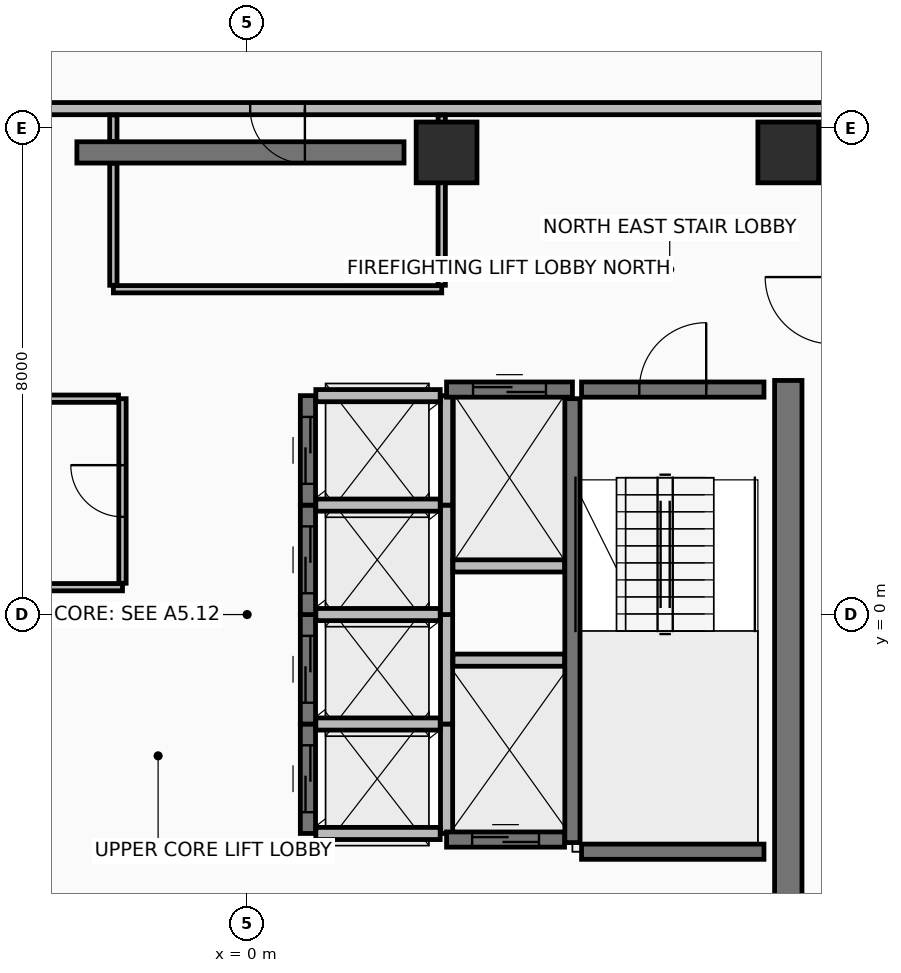
"""IFC4 building model, lengths in metres.
Left out: names, types, materials, properties, quantities, classifications, styles, units other than length and angle.
Written with IfcOpenShell. Run it as: python <this file> out.ifc"""

import sys

from ifc_helpers import new_model, si_unit, direction, frame, frame_2d, origin, origin_2d, place, context, subcontext, project, spatial, rectangle, extrude, element, fill, save


model = new_model("IFC4")
c1 = context("Model", 3, precision=1e-05, world=origin(), true_north=direction((0.0, 1.0)))
c2 = subcontext(c1, "Body", "Model", "MODEL_VIEW")
j1 = project(units=[si_unit("LENGTHUNIT", "METRE"), si_unit("PLANEANGLEUNIT", "RADIAN")], contexts=[c1])
p1 = place(None, origin())
s1 = spatial("IfcSite", under=j1, at=p1, CompositionType="ELEMENT")
p2 = place(p1, origin())
s2 = spatial("IfcBuilding", under=s1, at=p2, CompositionType="ELEMENT")
p3 = place(p2, frame((0.0, 0.0, 267.8)))
s3 = spatial("IfcBuildingStorey", under=s2, at=p3, CompositionType="ELEMENT", Elevation=267.8)
for number, where, z_axis, x_axis in (
    (1, (8.9, 7.6, 0.0), (0.0, 0.0, 1.0), (1.0, 0.0, 0.0)),
    (2, (3.28, 7.6, 0.0), (0.0, 0.0, 1.0), (1.0, 0.0, 0.0)),
):
    element("IfcColumn", number, at=place(p3, frame(where, z_axis=z_axis, x_axis=x_axis)), inside=s3, PredefinedType="COLUMN", context=c2, shape_type="SweptSolid", body=[
        extrude(rectangle(XDim=1.0, YDim=1.0, at=origin_2d()), origin(), (0.0, 0.0, 1.0), 3.6),
    ])
p4 = place(p3, frame((-2.8, 7.6, 0.0), z_axis=(0.0, 0.0, 1.0), x_axis=(1.0, 0.0, 0.0)))
e3 = element("IfcWall", 3, at=p4, inside=s3, PredefinedType="SHEAR", context=c2, shape_type="SweptSolid", body=[
    extrude(rectangle(XDim=5.38, YDim=0.35, at=frame_2d((2.69, 0.0))), origin(), (0.0, 0.0, 1.0), 3.42),
])
p5 = place(p3, frame((8.9, -6.85, 0.0), z_axis=(0.0, 0.0, 1.0), x_axis=(0.0, 1.0, 0.0)))
e4 = element("IfcWall", 4, at=p5, inside=s3, PredefinedType="SHEAR", context=c2, shape_type="SweptSolid", body=[
    extrude(rectangle(XDim=10.7, YDim=0.45, at=frame_2d((5.35, 0.0))), origin(), (0.0, 0.0, 1.0), 3.42),
])
p6 = place(p3, frame((9.62, 8.32, 0.0), z_axis=(0.0, 0.0, 1.0), x_axis=(-1.0, 0.0, 0.0)))
e5 = element("IfcWall", 5, at=p6, inside=s3, PredefinedType="PARTITIONING", context=c2, shape_type="SweptSolid", body=[
    extrude(rectangle(XDim=19.24, YDim=0.2, at=frame_2d((9.62, 0.0))), origin(), (0.0, 0.0, 1.0), 2.915),
])
p7 = place(p6, frame((8.67, 0.0, 0.0)))
e6 = element("IfcOpeningElement", 6, at=p7, cuts=e5, PredefinedType="OPENING", context=c2, shape_type="SweptSolid", body=[
    extrude(rectangle(XDim=0.9, YDim=2.1, at=frame_2d((0.45, 1.05))), frame((0.0, 0.11, 0.0), z_axis=(0.0, -1.0, 0.0), x_axis=(1.0, 0.0, 0.0)), (0.0, 0.0, 1.0), 0.22),
])
p8 = place(p6, frame((15.745, 0.0, 0.0)))
e7 = element("IfcOpeningElement", 7, at=p8, cuts=e5, PredefinedType="OPENING", context=c2, shape_type="SweptSolid", body=[
    extrude(rectangle(XDim=0.9, YDim=2.1, at=frame_2d((0.45, 1.05))), frame((0.0, 0.11, 0.0), z_axis=(0.0, -1.0, 0.0), x_axis=(1.0, 0.0, 0.0)), (0.0, 0.0, 1.0), 0.22),
])
p9 = place(p6, frame((13.795, 0.0, 0.0)))
e8 = element("IfcOpeningElement", 8, at=p9, cuts=e5, PredefinedType="OPENING", context=c2, shape_type="SweptSolid", body=[
    extrude(rectangle(XDim=0.9, YDim=2.1, at=frame_2d((0.45, 1.05))), frame((0.0, 0.11, 0.0), z_axis=(0.0, -1.0, 0.0), x_axis=(1.0, 0.0, 0.0)), (0.0, 0.0, 1.0), 0.22),
])
p10 = place(p3, frame((5.35, -3.75, 0.0), z_axis=(0.0, 0.0, 1.0), x_axis=(0.0, 1.0, 0.0)))
e9 = element("IfcWall", 9, at=p10, inside=s3, PredefinedType="SHEAR", context=c2, shape_type="SweptSolid", body=[
    extrude(rectangle(XDim=7.3, YDim=0.25, at=frame_2d((3.65, 0.0))), origin(), (0.0, 0.0, 1.0), 3.42),
])
p11 = place(p3, frame((5.5, 3.7, 0.0), z_axis=(0.0, 0.0, 1.0), x_axis=(1.0, 0.0, 0.0)))
e10 = element("IfcWall", 10, at=p11, inside=s3, PredefinedType="SHEAR", context=c2, shape_type="SweptSolid", body=[
    extrude(rectangle(XDim=3.0, YDim=0.25, at=frame_2d((1.5, 0.0))), origin(), (0.0, 0.0, 1.0), 3.42),
])
p12 = place(p11, frame((0.95, 0.0, 0.0)))
e11 = element("IfcOpeningElement", 11, at=p12, cuts=e10, PredefinedType="OPENING", context=c2, shape_type="SweptSolid", body=[
    extrude(rectangle(XDim=1.1, YDim=2.15, at=frame_2d((0.55, 1.075))), frame((0.0, 0.135, 0.0), z_axis=(0.0, -1.0, 0.0), x_axis=(1.0, 0.0, 0.0)), (0.0, 0.0, 1.0), 0.27),
])
p13 = place(p3, frame((5.5, -3.9, 0.0), z_axis=(0.0, 0.0, 1.0), x_axis=(1.0, 0.0, 0.0)))
e12 = element("IfcWall", 12, at=p13, inside=s3, PredefinedType="SHEAR", context=c2, shape_type="SweptSolid", body=[
    extrude(rectangle(XDim=3.0, YDim=0.25, at=frame_2d((1.5, 0.0))), origin(), (0.0, 0.0, 1.0), 3.42),
])
p14 = place(p3, frame((1.0, -3.6, 0.0), z_axis=(0.0, 0.0, 1.0), x_axis=(0.0, 1.0, 0.0)))
e13 = element("IfcWall", 13, at=p14, inside=s3, PredefinedType="SHEAR", context=c2, shape_type="SweptSolid", body=[
    extrude(rectangle(XDim=1.8, YDim=0.25, at=frame_2d((0.9, 0.0))), origin(), (0.0, 0.0, 1.0), 3.42),
])
p15 = place(p14, frame((0.35, 0.0, 0.0)))
e14 = element("IfcOpeningElement", 14, at=p15, cuts=e13, PredefinedType="OPENING", context=c2, shape_type="SweptSolid", body=[
    extrude(rectangle(XDim=1.1, YDim=2.2, at=frame_2d((0.55, 1.1))), frame((0.0, 0.135, 0.0), z_axis=(0.0, -1.0, 0.0), x_axis=(1.0, 0.0, 0.0)), (0.0, 0.0, 1.0), 0.27),
])
p16 = place(p3, frame((3.28, -3.6, 0.0), z_axis=(0.0, 0.0, 1.0), x_axis=(0.0, 1.0, 0.0)))
e15 = element("IfcWall", 15, at=p16, inside=s3, PredefinedType="PARTITIONING", context=c2, shape_type="SweptSolid", body=[
    extrude(rectangle(XDim=1.8, YDim=0.2, at=frame_2d((0.9, 0.0))), origin(), (0.0, 0.0, 1.0), 3.42),
])
for number, where, z_axis, x_axis in (
    (16, (1.13, -3.6, 0.0), (0.0, 0.0, 1.0), (1.0, 0.0, 0.0)),
    (17, (1.13, -1.8, 0.0), (0.0, 0.0, 1.0), (1.0, 0.0, 0.0)),
):
    element("IfcWall", number, at=place(p3, frame(where, z_axis=z_axis, x_axis=x_axis)), inside=s3, PredefinedType="PARTITIONING", context=c2, shape_type="SweptSolid", body=[
        extrude(rectangle(XDim=2.045, YDim=0.2, at=frame_2d((1.022, 0.0))), origin(), (0.0, 0.0, 1.0), 3.42),
    ])
p17 = place(p3, frame((1.0, -1.8, 0.0), z_axis=(0.0, 0.0, 1.0), x_axis=(0.0, 1.0, 0.0)))
e18 = element("IfcWall", 18, at=p17, inside=s3, PredefinedType="SHEAR", context=c2, shape_type="SweptSolid", body=[
    extrude(rectangle(XDim=1.8, YDim=0.25, at=frame_2d((0.9, 0.0))), origin(), (0.0, 0.0, 1.0), 3.42),
])
p18 = place(p17, frame((0.35, 0.0, 0.0)))
e19 = element("IfcOpeningElement", 19, at=p18, cuts=e18, PredefinedType="OPENING", context=c2, shape_type="SweptSolid", body=[
    extrude(rectangle(XDim=1.1, YDim=2.2, at=frame_2d((0.55, 1.1))), frame((0.0, 0.135, 0.0), z_axis=(0.0, -1.0, 0.0), x_axis=(1.0, 0.0, 0.0)), (0.0, 0.0, 1.0), 0.27),
])
p19 = place(p3, frame((3.28, -1.8, 0.0), z_axis=(0.0, 0.0, 1.0), x_axis=(0.0, 1.0, 0.0)))
e20 = element("IfcWall", 20, at=p19, inside=s3, PredefinedType="PARTITIONING", context=c2, shape_type="SweptSolid", body=[
    extrude(rectangle(XDim=1.8, YDim=0.2, at=frame_2d((0.9, 0.0))), origin(), (0.0, 0.0, 1.0), 3.42),
])
p20 = place(p3, frame((1.13, 0.0, 0.0), z_axis=(0.0, 0.0, 1.0), x_axis=(1.0, 0.0, 0.0)))
e21 = element("IfcWall", 21, at=p20, inside=s3, PredefinedType="PARTITIONING", context=c2, shape_type="SweptSolid", body=[
    extrude(rectangle(XDim=2.045, YDim=0.2, at=frame_2d((1.022, 0.0))), origin(), (0.0, 0.0, 1.0), 3.42),
])
p21 = place(p3, frame((1.0, 0.0, 0.0), z_axis=(0.0, 0.0, 1.0), x_axis=(0.0, 1.0, 0.0)))
e22 = element("IfcWall", 22, at=p21, inside=s3, PredefinedType="SHEAR", context=c2, shape_type="SweptSolid", body=[
    extrude(rectangle(XDim=1.8, YDim=0.25, at=frame_2d((0.9, 0.0))), origin(), (0.0, 0.0, 1.0), 3.42),
])
p22 = place(p21, frame((0.35, 0.0, 0.0)))
e23 = element("IfcOpeningElement", 23, at=p22, cuts=e22, PredefinedType="OPENING", context=c2, shape_type="SweptSolid", body=[
    extrude(rectangle(XDim=1.1, YDim=2.2, at=frame_2d((0.55, 1.1))), frame((0.0, 0.135, 0.0), z_axis=(0.0, -1.0, 0.0), x_axis=(1.0, 0.0, 0.0)), (0.0, 0.0, 1.0), 0.27),
])
p23 = place(p3, frame((3.28, 0.0, 0.0), z_axis=(0.0, 0.0, 1.0), x_axis=(0.0, 1.0, 0.0)))
e24 = element("IfcWall", 24, at=p23, inside=s3, PredefinedType="PARTITIONING", context=c2, shape_type="SweptSolid", body=[
    extrude(rectangle(XDim=1.8, YDim=0.2, at=frame_2d((0.9, 0.0))), origin(), (0.0, 0.0, 1.0), 3.42),
])
p24 = place(p3, frame((1.13, 1.8, 0.0), z_axis=(0.0, 0.0, 1.0), x_axis=(1.0, 0.0, 0.0)))
e25 = element("IfcWall", 25, at=p24, inside=s3, PredefinedType="PARTITIONING", context=c2, shape_type="SweptSolid", body=[
    extrude(rectangle(XDim=2.045, YDim=0.2, at=frame_2d((1.022, 0.0))), origin(), (0.0, 0.0, 1.0), 3.42),
])
p25 = place(p3, frame((1.0, 1.8, 0.0), z_axis=(0.0, 0.0, 1.0), x_axis=(0.0, 1.0, 0.0)))
e26 = element("IfcWall", 26, at=p25, inside=s3, PredefinedType="SHEAR", context=c2, shape_type="SweptSolid", body=[
    extrude(rectangle(XDim=1.8, YDim=0.25, at=frame_2d((0.9, 0.0))), origin(), (0.0, 0.0, 1.0), 3.42),
])
p26 = place(p25, frame((0.35, 0.0, 0.0)))
e27 = element("IfcOpeningElement", 27, at=p26, cuts=e26, PredefinedType="OPENING", context=c2, shape_type="SweptSolid", body=[
    extrude(rectangle(XDim=1.1, YDim=2.2, at=frame_2d((0.55, 1.1))), frame((0.0, 0.135, 0.0), z_axis=(0.0, -1.0, 0.0), x_axis=(1.0, 0.0, 0.0)), (0.0, 0.0, 1.0), 0.27),
])
p27 = place(p3, frame((3.28, 1.8, 0.0), z_axis=(0.0, 0.0, 1.0), x_axis=(0.0, 1.0, 0.0)))
e28 = element("IfcWall", 28, at=p27, inside=s3, PredefinedType="PARTITIONING", context=c2, shape_type="SweptSolid", body=[
    extrude(rectangle(XDim=1.8, YDim=0.2, at=frame_2d((0.9, 0.0))), origin(), (0.0, 0.0, 1.0), 3.42),
])
p28 = place(p3, frame((1.13, 3.6, 0.0), z_axis=(0.0, 0.0, 1.0), x_axis=(1.0, 0.0, 0.0)))
e29 = element("IfcWall", 29, at=p28, inside=s3, PredefinedType="PARTITIONING", context=c2, shape_type="SweptSolid", body=[
    extrude(rectangle(XDim=2.045, YDim=0.2, at=frame_2d((1.022, 0.0))), origin(), (0.0, 0.0, 1.0), 2.715),
])
p29 = place(p3, frame((3.28, 3.7, 0.0), z_axis=(0.0, 0.0, 1.0), x_axis=(1.0, 0.0, 0.0)))
e30 = element("IfcWall", 30, at=p29, inside=s3, PredefinedType="SHEAR", context=c2, shape_type="SweptSolid", body=[
    extrude(rectangle(XDim=2.07, YDim=0.25, at=frame_2d((1.035, 0.0))), origin(), (0.0, 0.0, 1.0), 3.42),
])
p30 = place(p29, frame((0.435, 0.0, 0.0)))
e31 = element("IfcOpeningElement", 31, at=p30, cuts=e30, PredefinedType="OPENING", context=c2, shape_type="SweptSolid", body=[
    extrude(rectangle(XDim=1.2, YDim=2.2, at=frame_2d((0.6, 1.1))), frame((0.0, 0.135, 0.0), z_axis=(0.0, -1.0, 0.0), x_axis=(1.0, 0.0, 0.0)), (0.0, 0.0, 1.0), 0.27),
])
p31 = place(p3, frame((3.385, 0.8, 0.0), z_axis=(0.0, 0.0, 1.0), x_axis=(1.0, 0.0, 0.0)))
e32 = element("IfcWall", 32, at=p31, inside=s3, PredefinedType="PARTITIONING", context=c2, shape_type="SweptSolid", body=[
    extrude(rectangle(XDim=1.835, YDim=0.2, at=frame_2d((0.917, 0.0))), origin(), (0.0, 0.0, 1.0), 3.42),
])
p32 = place(p3, frame((3.28, -3.7, 0.0), z_axis=(0.0, 0.0, 1.0), x_axis=(1.0, 0.0, 0.0)))
e33 = element("IfcWall", 33, at=p32, inside=s3, PredefinedType="SHEAR", context=c2, shape_type="SweptSolid", body=[
    extrude(rectangle(XDim=1.94, YDim=0.25, at=frame_2d((0.97, 0.0))), origin(), (0.0, 0.0, 1.0), 3.42),
])
p33 = place(p32, frame((0.42, 0.0, 0.0)))
e34 = element("IfcOpeningElement", 34, at=p33, cuts=e33, PredefinedType="OPENING", context=c2, shape_type="SweptSolid", body=[
    extrude(rectangle(XDim=1.1, YDim=2.2, at=frame_2d((0.55, 1.1))), frame((0.0, 0.135, 0.0), z_axis=(0.0, -1.0, 0.0), x_axis=(1.0, 0.0, 0.0)), (0.0, 0.0, 1.0), 0.27),
])
p34 = place(p3, frame((3.385, -0.75, 0.0), z_axis=(0.0, 0.0, 1.0), x_axis=(1.0, 0.0, 0.0)))
e35 = element("IfcWall", 35, at=p34, inside=s3, PredefinedType="PARTITIONING", context=c2, shape_type="SweptSolid", body=[
    extrude(rectangle(XDim=1.835, YDim=0.2, at=frame_2d((0.917, 0.0))), origin(), (0.0, 0.0, 1.0), 3.42),
])
p35 = place(p3, frame((-5.22, 0.45, 0.0), z_axis=(0.0, 0.0, 1.0), x_axis=(1.0, 0.0, 0.0)))
e36 = element("IfcWall", 36, at=p35, inside=s3, PredefinedType="PARTITIONING", context=c2, shape_type="SweptSolid", body=[
    extrude(rectangle(XDim=3.17, YDim=0.12, at=frame_2d((1.585, 0.0))), origin(), (0.0, 0.0, 1.0), 3.42),
])
p36 = place(p3, frame((-2.05, 0.515, 0.0), z_axis=(0.0, 0.0, 1.0), x_axis=(0.0, 1.0, 0.0)))
e37 = element("IfcWall", 37, at=p36, inside=s3, PredefinedType="PARTITIONING", context=c2, shape_type="SweptSolid", body=[
    extrude(rectangle(XDim=3.035, YDim=0.12, at=frame_2d((1.518, 0.0))), origin(), (0.0, 0.0, 1.0), 3.42),
])
p37 = place(p36, frame((1.092, 0.0, 0.0)))
e38 = element("IfcOpeningElement", 38, at=p37, cuts=e37, PredefinedType="OPENING", context=c2, shape_type="SweptSolid", body=[
    extrude(rectangle(XDim=0.85, YDim=2.1, at=frame_2d((0.425, 1.05))), frame((0.0, 0.07, 0.0), z_axis=(0.0, -1.0, 0.0), x_axis=(1.0, 0.0, 0.0)), (0.0, 0.0, 1.0), 0.14),
])
p38 = place(p3, frame((-2.115, 3.55, 0.0), z_axis=(0.0, 0.0, 1.0), x_axis=(-1.0, 0.0, 0.0)))
e39 = element("IfcWall", 39, at=p38, inside=s3, PredefinedType="PARTITIONING", context=c2, shape_type="SweptSolid", body=[
    extrude(rectangle(XDim=3.105, YDim=0.12, at=frame_2d((1.552, 0.0))), origin(), (0.0, 0.0, 1.0), 3.42),
])
p39 = place(p3, frame((-2.2, 5.35, 0.0), z_axis=(0.0, 0.0, 1.0), x_axis=(1.0, 0.0, 0.0)))
e40 = element("IfcWall", 40, at=p39, inside=s3, PredefinedType="PARTITIONING", context=c2, shape_type="SweptSolid", body=[
    extrude(rectangle(XDim=5.4, YDim=0.12, at=frame_2d((2.7, 0.0))), origin(), (0.0, 0.0, 1.0), 2.715),
])
p40 = place(p3, frame((3.2, 5.415, 0.0), z_axis=(0.0, 0.0, 1.0), x_axis=(0.0, 1.0, 0.0)))
e41 = element("IfcWall", 41, at=p40, inside=s3, PredefinedType="PARTITIONING", context=c2, shape_type="SweptSolid", body=[
    extrude(rectangle(XDim=2.8, YDim=0.12, at=frame_2d((1.4, 0.0))), origin(), (0.0, 0.0, 1.0), 2.715),
])
p41 = place(p3, frame((-2.2, 8.215, 0.0), z_axis=(0.0, 0.0, 1.0), x_axis=(0.0, -1.0, 0.0)))
e42 = element("IfcWall", 42, at=p41, inside=s3, PredefinedType="PARTITIONING", context=c2, shape_type="SweptSolid", body=[
    extrude(rectangle(XDim=0.435, YDim=0.12, at=frame_2d((0.218, 0.0))), origin(), (0.0, 0.0, 1.0), 2.715),
])
p42 = place(p3, frame((-2.2, 7.42, 0.0), z_axis=(0.0, 0.0, 1.0), x_axis=(0.0, -1.0, 0.0)))
e43 = element("IfcWall", 43, at=p42, inside=s3, PredefinedType="PARTITIONING", context=c2, shape_type="SweptSolid", body=[
    extrude(rectangle(XDim=2.005, YDim=0.12, at=frame_2d((1.002, 0.0))), origin(), (0.0, 0.0, 1.0), 2.715),
])
p43 = place(p12, frame((1.1, 0.0, 0.0), z_axis=(0.0, 0.0, 1.0), x_axis=(-1.0, 0.0, 0.0)))
e44 = element("IfcDoor", 44, at=p43, inside=s3, OperationType="SINGLE_SWING_LEFT", PredefinedType="DOOR", context=c2, shape_type="SweptSolid", body=[
    extrude(rectangle(XDim=1.1, YDim=2.15, at=frame_2d((0.55, 1.075))), frame((0.0, 0.025, 0.0), z_axis=(0.0, -1.0, 0.0), x_axis=(1.0, 0.0, 0.0)), (0.0, 0.0, 1.0), 0.05),
])
fill(e11, e44)
p44 = place(p15, origin())
e45 = element("IfcDoor", 45, at=p44, inside=s3, OperationType="SLIDING_TO_LEFT", PredefinedType="DOOR", context=c2, shape_type="SweptSolid", body=[
    extrude(rectangle(XDim=1.1, YDim=2.2, at=frame_2d((0.55, 1.1))), frame((0.0, 0.025, 0.0), z_axis=(0.0, -1.0, 0.0), x_axis=(1.0, 0.0, 0.0)), (0.0, 0.0, 1.0), 0.05),
])
fill(e14, e45)
p45 = place(p18, origin())
e46 = element("IfcDoor", 46, at=p45, inside=s3, OperationType="SLIDING_TO_LEFT", PredefinedType="DOOR", context=c2, shape_type="SweptSolid", body=[
    extrude(rectangle(XDim=1.1, YDim=2.2, at=frame_2d((0.55, 1.1))), frame((0.0, 0.025, 0.0), z_axis=(0.0, -1.0, 0.0), x_axis=(1.0, 0.0, 0.0)), (0.0, 0.0, 1.0), 0.05),
])
fill(e19, e46)
p46 = place(p22, origin())
e47 = element("IfcDoor", 47, at=p46, inside=s3, OperationType="SLIDING_TO_LEFT", PredefinedType="DOOR", context=c2, shape_type="SweptSolid", body=[
    extrude(rectangle(XDim=1.1, YDim=2.2, at=frame_2d((0.55, 1.1))), frame((0.0, 0.025, 0.0), z_axis=(0.0, -1.0, 0.0), x_axis=(1.0, 0.0, 0.0)), (0.0, 0.0, 1.0), 0.05),
])
fill(e23, e47)
p47 = place(p26, origin())
e48 = element("IfcDoor", 48, at=p47, inside=s3, OperationType="SLIDING_TO_LEFT", PredefinedType="DOOR", context=c2, shape_type="SweptSolid", body=[
    extrude(rectangle(XDim=1.1, YDim=2.2, at=frame_2d((0.55, 1.1))), frame((0.0, 0.025, 0.0), z_axis=(0.0, -1.0, 0.0), x_axis=(1.0, 0.0, 0.0)), (0.0, 0.0, 1.0), 0.05),
])
fill(e27, e48)
p48 = place(p30, origin())
e49 = element("IfcDoor", 49, at=p48, inside=s3, OperationType="SLIDING_TO_RIGHT", PredefinedType="DOOR", context=c2, shape_type="SweptSolid", body=[
    extrude(rectangle(XDim=1.2, YDim=2.2, at=frame_2d((0.6, 1.1))), frame((0.0, 0.025, 0.0), z_axis=(0.0, -1.0, 0.0), x_axis=(1.0, 0.0, 0.0)), (0.0, 0.0, 1.0), 0.05),
])
fill(e31, e49)
p49 = place(p33, origin())
e50 = element("IfcDoor", 50, at=p49, inside=s3, OperationType="SLIDING_TO_LEFT", PredefinedType="DOOR", context=c2, shape_type="SweptSolid", body=[
    extrude(rectangle(XDim=1.1, YDim=2.2, at=frame_2d((0.55, 1.1))), frame((0.0, 0.025, 0.0), z_axis=(0.0, -1.0, 0.0), x_axis=(1.0, 0.0, 0.0)), (0.0, 0.0, 1.0), 0.05),
])
fill(e34, e50)
p50 = place(p37, frame((0.85, 0.0, 0.0), z_axis=(0.0, 0.0, 1.0), x_axis=(-1.0, 0.0, 0.0)))
e51 = element("IfcDoor", 51, at=p50, inside=s3, OperationType="SINGLE_SWING_RIGHT", PredefinedType="DOOR", context=c2, shape_type="SweptSolid", body=[
    extrude(rectangle(XDim=0.85, YDim=2.1, at=frame_2d((0.425, 1.05))), frame((0.0, 0.025, 0.0), z_axis=(0.0, -1.0, 0.0), x_axis=(1.0, 0.0, 0.0)), (0.0, 0.0, 1.0), 0.05),
])
fill(e38, e51)
p51 = place(p7, origin())
e52 = element("IfcDoor", 52, at=p51, inside=s3, OperationType="SINGLE_SWING_LEFT", PredefinedType="DOOR", context=c2, shape_type="SweptSolid", body=[
    extrude(rectangle(XDim=0.9, YDim=2.1, at=frame_2d((0.45, 1.05))), frame((0.0, 0.025, 0.0), z_axis=(0.0, -1.0, 0.0), x_axis=(1.0, 0.0, 0.0)), (0.0, 0.0, 1.0), 0.05),
])
fill(e6, e52)
save(model, sys.argv[1])
